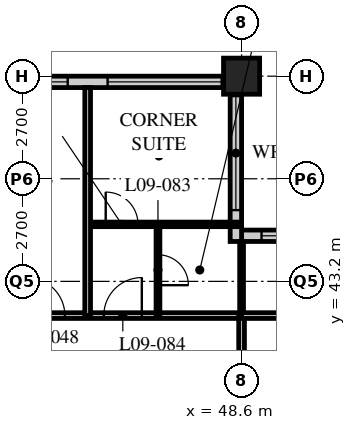
"""IFC4 building model, lengths in metres.
Left out: names, types, materials, properties, quantities, classifications, styles, units other than length and angle.
Written with IfcOpenShell. Run it as: python <this file> out.ifc"""

import sys

from ifc_helpers import new_model, si_unit, direction, frame, frame_2d, origin, origin_2d, place, context, subcontext, project, spatial, rectangle, hollow_rectangle, extrude, element, fill, save


model = new_model("IFC4")
c1 = context("Model", 3, precision=1e-05, world=origin(), true_north=direction((0.0, 1.0)))
c2 = subcontext(c1, "Body", "Model", "MODEL_VIEW")
j1 = project(units=[si_unit("LENGTHUNIT", "METRE"), si_unit("PLANEANGLEUNIT", "RADIAN")], contexts=[c1])
p1 = place(None, origin())
s1 = spatial("IfcSite", under=j1, at=p1, CompositionType="ELEMENT")
p2 = place(p1, origin())
s2 = spatial("IfcBuilding", under=s1, at=p2, CompositionType="ELEMENT")
p3 = place(p2, frame((0.0, 0.0, 43.2)))
s3 = spatial("IfcBuildingStorey", under=s2, at=p3, CompositionType="ELEMENT", Elevation=43.2)
p4 = place(p3, frame((48.6, 48.6, 0.0), z_axis=(0.0, 0.0, 1.0), x_axis=(1.0, 0.0, 0.0)))
e1 = element("IfcColumn", 1, at=p4, inside=s3, PredefinedType="COLUMN", context=c2, shape_type="SweptSolid", body=[
    extrude(hollow_rectangle(XDim=0.95, YDim=0.95, WallThickness=0.095, at=origin_2d()), origin(), (0.0, 0.0, 1.0), 3.4),
])
p5 = place(p3, frame((52.35, 44.4, 0.0), z_axis=(0.0, 0.0, 1.0), x_axis=(-1.0, 0.0, 0.0)))
e2 = element("IfcWall", 2, at=p5, inside=s3, PredefinedType="SOLIDWALL", context=c2, shape_type="SweptSolid", body=[
    extrude(rectangle(XDim=3.75, YDim=0.3, at=frame_2d((1.875, 0.0))), origin(), (0.0, 0.0, 1.0), 3.19),
])
p6 = place(p5, frame((0.225, 0.0, 0.9)))
e3 = element("IfcOpeningElement", 3, at=p6, cuts=e2, PredefinedType="OPENING", context=c2, shape_type="SweptSolid", body=[
    extrude(rectangle(XDim=3.0, YDim=1.5, at=frame_2d((1.5, 0.75))), frame((0.0, 0.16, 0.0), z_axis=(0.0, -1.0, 0.0), x_axis=(1.0, 0.0, 0.0)), (0.0, 0.0, 1.0), 0.32),
])
p7 = place(p3, frame((48.45, 44.25, 0.0), z_axis=(0.0, 0.0, 1.0), x_axis=(0.0, 1.0, 0.0)))
e4 = element("IfcWall", 4, at=p7, inside=s3, PredefinedType="SOLIDWALL", context=c2, shape_type="SweptSolid", body=[
    extrude(rectangle(XDim=4.35, YDim=0.3, at=frame_2d((2.175, 0.0))), origin(), (0.0, 0.0, 1.0), 3.19),
])
p8 = place(p7, frame((0.825, 0.0, 0.9)))
e5 = element("IfcOpeningElement", 5, at=p8, cuts=e4, PredefinedType="OPENING", context=c2, shape_type="SweptSolid", body=[
    extrude(rectangle(XDim=3.0, YDim=1.5, at=frame_2d((1.5, 0.75))), frame((0.0, 0.16, 0.0), z_axis=(0.0, -1.0, 0.0), x_axis=(1.0, 0.0, 0.0)), (0.0, 0.0, 1.0), 0.32),
])
p9 = place(p3, frame((48.3, 48.45, 0.0), z_axis=(0.0, 0.0, 1.0), x_axis=(-1.0, 0.0, 0.0)))
e6 = element("IfcWall", 6, at=p9, inside=s3, PredefinedType="SOLIDWALL", context=c2, shape_type="SweptSolid", body=[
    extrude(rectangle(XDim=40.2, YDim=0.3, at=frame_2d((20.1, 0.0))), origin(), (0.0, 0.0, 1.0), 3.19),
])
p10 = place(p9, frame((0.225, 0.0, 0.9)))
e7 = element("IfcOpeningElement", 7, at=p10, cuts=e6, PredefinedType="OPENING", context=c2, shape_type="SweptSolid", body=[
    extrude(rectangle(XDim=3.0, YDim=2.0, at=frame_2d((1.5, 1.0))), frame((0.0, 0.16, 0.0), z_axis=(0.0, -1.0, 0.0), x_axis=(1.0, 0.0, 0.0)), (0.0, 0.0, 1.0), 0.32),
])
p11 = place(p9, frame((4.275, 0.0, 0.9)))
e8 = element("IfcOpeningElement", 8, at=p11, cuts=e6, PredefinedType="OPENING", context=c2, shape_type="SweptSolid", body=[
    extrude(rectangle(XDim=3.0, YDim=2.0, at=frame_2d((1.5, 1.0))), frame((0.0, 0.16, 0.0), z_axis=(0.0, -1.0, 0.0), x_axis=(1.0, 0.0, 0.0)), (0.0, 0.0, 1.0), 0.32),
])
p12 = place(p9, frame((8.325, 0.0, 0.9)))
e9 = element("IfcOpeningElement", 9, at=p12, cuts=e6, PredefinedType="OPENING", context=c2, shape_type="SweptSolid", body=[
    extrude(rectangle(XDim=3.0, YDim=2.0, at=frame_2d((1.5, 1.0))), frame((0.0, 0.16, 0.0), z_axis=(0.0, -1.0, 0.0), x_axis=(1.0, 0.0, 0.0)), (0.0, 0.0, 1.0), 0.32),
])
p13 = place(p9, frame((12.375, 0.0, 0.9)))
e10 = element("IfcOpeningElement", 10, at=p13, cuts=e6, PredefinedType="OPENING", context=c2, shape_type="SweptSolid", body=[
    extrude(rectangle(XDim=3.0, YDim=2.0, at=frame_2d((1.5, 1.0))), frame((0.0, 0.16, 0.0), z_axis=(0.0, -1.0, 0.0), x_axis=(1.0, 0.0, 0.0)), (0.0, 0.0, 1.0), 0.32),
])
p14 = place(p9, frame((16.425, 0.0, 0.9)))
e11 = element("IfcOpeningElement", 11, at=p14, cuts=e6, PredefinedType="OPENING", context=c2, shape_type="SweptSolid", body=[
    extrude(rectangle(XDim=3.0, YDim=2.0, at=frame_2d((1.5, 1.0))), frame((0.0, 0.16, 0.0), z_axis=(0.0, -1.0, 0.0), x_axis=(1.0, 0.0, 0.0)), (0.0, 0.0, 1.0), 0.32),
])
p15 = place(p9, frame((20.475, 0.0, 0.9)))
e12 = element("IfcOpeningElement", 12, at=p15, cuts=e6, PredefinedType="OPENING", context=c2, shape_type="SweptSolid", body=[
    extrude(rectangle(XDim=3.0, YDim=2.0, at=frame_2d((1.5, 1.0))), frame((0.0, 0.16, 0.0), z_axis=(0.0, -1.0, 0.0), x_axis=(1.0, 0.0, 0.0)), (0.0, 0.0, 1.0), 0.32),
])
p16 = place(p9, frame((24.525, 0.0, 0.9)))
e13 = element("IfcOpeningElement", 13, at=p16, cuts=e6, PredefinedType="OPENING", context=c2, shape_type="SweptSolid", body=[
    extrude(rectangle(XDim=3.0, YDim=2.0, at=frame_2d((1.5, 1.0))), frame((0.0, 0.16, 0.0), z_axis=(0.0, -1.0, 0.0), x_axis=(1.0, 0.0, 0.0)), (0.0, 0.0, 1.0), 0.32),
])
p17 = place(p9, frame((28.575, 0.0, 0.9)))
e14 = element("IfcOpeningElement", 14, at=p17, cuts=e6, PredefinedType="OPENING", context=c2, shape_type="SweptSolid", body=[
    extrude(rectangle(XDim=3.0, YDim=2.0, at=frame_2d((1.5, 1.0))), frame((0.0, 0.16, 0.0), z_axis=(0.0, -1.0, 0.0), x_axis=(1.0, 0.0, 0.0)), (0.0, 0.0, 1.0), 0.32),
])
p18 = place(p9, frame((32.625, 0.0, 0.9)))
e15 = element("IfcOpeningElement", 15, at=p18, cuts=e6, PredefinedType="OPENING", context=c2, shape_type="SweptSolid", body=[
    extrude(rectangle(XDim=3.0, YDim=2.0, at=frame_2d((1.5, 1.0))), frame((0.0, 0.16, 0.0), z_axis=(0.0, -1.0, 0.0), x_axis=(1.0, 0.0, 0.0)), (0.0, 0.0, 1.0), 0.32),
])
p19 = place(p9, frame((36.675, 0.0, 0.9)))
e16 = element("IfcOpeningElement", 16, at=p19, cuts=e6, PredefinedType="OPENING", context=c2, shape_type="SweptSolid", body=[
    extrude(rectangle(XDim=3.0, YDim=2.0, at=frame_2d((1.5, 1.0))), frame((0.0, 0.16, 0.0), z_axis=(0.0, -1.0, 0.0), x_axis=(1.0, 0.0, 0.0)), (0.0, 0.0, 1.0), 0.32),
])
p20 = place(p3, frame((8.1, 42.3, 0.0), z_axis=(0.0, 0.0, 1.0), x_axis=(1.0, 0.0, 0.0)))
e17 = element("IfcWall", 17, at=p20, inside=s3, PredefinedType="PARTITIONING", context=c2, shape_type="SweptSolid", body=[
    extrude(rectangle(XDim=40.5, YDim=0.15, at=frame_2d((20.25, 0.0))), origin(), (0.0, 0.0, 1.0), 3.19),
])
p21 = place(p20, frame((6.5, 0.0, 0.0)))
e18 = element("IfcOpeningElement", 18, at=p21, cuts=e17, PredefinedType="OPENING", context=c2, shape_type="SweptSolid", body=[
    extrude(rectangle(XDim=1.0, YDim=2.1, at=frame_2d((0.5, 1.05))), frame((0.0, 0.085, 0.0), z_axis=(0.0, -1.0, 0.0), x_axis=(1.0, 0.0, 0.0)), (0.0, 0.0, 1.0), 0.17),
])
p22 = place(p20, frame((10.55, 0.0, 0.0)))
e19 = element("IfcOpeningElement", 19, at=p22, cuts=e17, PredefinedType="OPENING", context=c2, shape_type="SweptSolid", body=[
    extrude(rectangle(XDim=1.0, YDim=2.1, at=frame_2d((0.5, 1.05))), frame((0.0, 0.085, 0.0), z_axis=(0.0, -1.0, 0.0), x_axis=(1.0, 0.0, 0.0)), (0.0, 0.0, 1.0), 0.17),
])
p23 = place(p20, frame((14.6, 0.0, 0.0)))
e20 = element("IfcOpeningElement", 20, at=p23, cuts=e17, PredefinedType="OPENING", context=c2, shape_type="SweptSolid", body=[
    extrude(rectangle(XDim=1.0, YDim=2.1, at=frame_2d((0.5, 1.05))), frame((0.0, 0.085, 0.0), z_axis=(0.0, -1.0, 0.0), x_axis=(1.0, 0.0, 0.0)), (0.0, 0.0, 1.0), 0.17),
])
p24 = place(p20, frame((18.65, 0.0, 0.0)))
e21 = element("IfcOpeningElement", 21, at=p24, cuts=e17, PredefinedType="OPENING", context=c2, shape_type="SweptSolid", body=[
    extrude(rectangle(XDim=1.0, YDim=2.1, at=frame_2d((0.5, 1.05))), frame((0.0, 0.085, 0.0), z_axis=(0.0, -1.0, 0.0), x_axis=(1.0, 0.0, 0.0)), (0.0, 0.0, 1.0), 0.17),
])
p25 = place(p20, frame((22.7, 0.0, 0.0)))
e22 = element("IfcOpeningElement", 22, at=p25, cuts=e17, PredefinedType="OPENING", context=c2, shape_type="SweptSolid", body=[
    extrude(rectangle(XDim=1.0, YDim=2.1, at=frame_2d((0.5, 1.05))), frame((0.0, 0.085, 0.0), z_axis=(0.0, -1.0, 0.0), x_axis=(1.0, 0.0, 0.0)), (0.0, 0.0, 1.0), 0.17),
])
p26 = place(p20, frame((26.75, 0.0, 0.0)))
e23 = element("IfcOpeningElement", 23, at=p26, cuts=e17, PredefinedType="OPENING", context=c2, shape_type="SweptSolid", body=[
    extrude(rectangle(XDim=1.0, YDim=2.1, at=frame_2d((0.5, 1.05))), frame((0.0, 0.085, 0.0), z_axis=(0.0, -1.0, 0.0), x_axis=(1.0, 0.0, 0.0)), (0.0, 0.0, 1.0), 0.17),
])
p27 = place(p20, frame((30.8, 0.0, 0.0)))
e24 = element("IfcOpeningElement", 24, at=p27, cuts=e17, PredefinedType="OPENING", context=c2, shape_type="SweptSolid", body=[
    extrude(rectangle(XDim=1.0, YDim=2.1, at=frame_2d((0.5, 1.05))), frame((0.0, 0.085, 0.0), z_axis=(0.0, -1.0, 0.0), x_axis=(1.0, 0.0, 0.0)), (0.0, 0.0, 1.0), 0.17),
])
p28 = place(p20, frame((34.85, 0.0, 0.0)))
e25 = element("IfcOpeningElement", 25, at=p28, cuts=e17, PredefinedType="OPENING", context=c2, shape_type="SweptSolid", body=[
    extrude(rectangle(XDim=1.0, YDim=2.1, at=frame_2d((0.5, 1.05))), frame((0.0, 0.085, 0.0), z_axis=(0.0, -1.0, 0.0), x_axis=(1.0, 0.0, 0.0)), (0.0, 0.0, 1.0), 0.17),
])
p29 = place(p20, frame((36.875, 0.0, 0.0)))
e26 = element("IfcOpeningElement", 26, at=p29, cuts=e17, PredefinedType="OPENING", context=c2, shape_type="SweptSolid", body=[
    extrude(rectangle(XDim=1.0, YDim=2.1, at=frame_2d((0.5, 1.05))), frame((0.0, 0.085, 0.0), z_axis=(0.0, -1.0, 0.0), x_axis=(1.0, 0.0, 0.0)), (0.0, 0.0, 1.0), 0.17),
])
p30 = place(p20, frame((2.625, 0.0, 0.0)))
e27 = element("IfcOpeningElement", 27, at=p30, cuts=e17, PredefinedType="OPENING", context=c2, shape_type="SweptSolid", body=[
    extrude(rectangle(XDim=1.0, YDim=2.1, at=frame_2d((0.5, 1.05))), frame((0.0, 0.085, 0.0), z_axis=(0.0, -1.0, 0.0), x_axis=(1.0, 0.0, 0.0)), (0.0, 0.0, 1.0), 0.17),
])
p31 = place(p3, frame((48.6, 16.2, 0.0), z_axis=(0.0, 0.0, 1.0), x_axis=(0.0, 1.0, 0.0)))
e28 = element("IfcWall", 28, at=p31, inside=s3, PredefinedType="PARTITIONING", context=c2, shape_type="SweptSolid", body=[
    extrude(rectangle(XDim=26.1, YDim=0.15, at=frame_2d((13.05, 0.0))), origin(), (0.0, 0.0, 1.0), 2.578),
])
p32 = place(p31, frame((2.75, 0.0, 0.0)))
e29 = element("IfcOpeningElement", 29, at=p32, cuts=e28, PredefinedType="OPENING", context=c2, shape_type="SweptSolid", body=[
    extrude(rectangle(XDim=1.0, YDim=2.1, at=frame_2d((0.5, 1.05))), frame((0.0, 0.085, 0.0), z_axis=(0.0, -1.0, 0.0), x_axis=(1.0, 0.0, 0.0)), (0.0, 0.0, 1.0), 0.17),
])
p33 = place(p31, frame((4.35, 0.0, 0.0)))
e30 = element("IfcOpeningElement", 30, at=p33, cuts=e28, PredefinedType="OPENING", context=c2, shape_type="SweptSolid", body=[
    extrude(rectangle(XDim=1.0, YDim=2.1, at=frame_2d((0.5, 1.05))), frame((0.0, 0.085, 0.0), z_axis=(0.0, -1.0, 0.0), x_axis=(1.0, 0.0, 0.0)), (0.0, 0.0, 1.0), 0.17),
])
p34 = place(p31, frame((10.85, 0.0, 0.0)))
e31 = element("IfcOpeningElement", 31, at=p34, cuts=e28, PredefinedType="OPENING", context=c2, shape_type="SweptSolid", body=[
    extrude(rectangle(XDim=1.0, YDim=2.1, at=frame_2d((0.5, 1.05))), frame((0.0, 0.085, 0.0), z_axis=(0.0, -1.0, 0.0), x_axis=(1.0, 0.0, 0.0)), (0.0, 0.0, 1.0), 0.17),
])
p35 = place(p31, frame((12.45, 0.0, 0.0)))
e32 = element("IfcOpeningElement", 32, at=p35, cuts=e28, PredefinedType="OPENING", context=c2, shape_type="SweptSolid", body=[
    extrude(rectangle(XDim=1.0, YDim=2.1, at=frame_2d((0.5, 1.05))), frame((0.0, 0.085, 0.0), z_axis=(0.0, -1.0, 0.0), x_axis=(1.0, 0.0, 0.0)), (0.0, 0.0, 1.0), 0.17),
])
p36 = place(p31, frame((18.65, 0.0, 0.0)))
e33 = element("IfcOpeningElement", 33, at=p36, cuts=e28, PredefinedType="OPENING", context=c2, shape_type="SweptSolid", body=[
    extrude(rectangle(XDim=1.0, YDim=2.1, at=frame_2d((0.5, 1.05))), frame((0.0, 0.085, 0.0), z_axis=(0.0, -1.0, 0.0), x_axis=(1.0, 0.0, 0.0)), (0.0, 0.0, 1.0), 0.17),
])
p37 = place(p31, frame((22.7, 0.0, 0.0)))
e34 = element("IfcOpeningElement", 34, at=p37, cuts=e28, PredefinedType="OPENING", context=c2, shape_type="SweptSolid", body=[
    extrude(rectangle(XDim=1.0, YDim=2.1, at=frame_2d((0.5, 1.05))), frame((0.0, 0.085, 0.0), z_axis=(0.0, -1.0, 0.0), x_axis=(1.0, 0.0, 0.0)), (0.0, 0.0, 1.0), 0.17),
])
p38 = place(p3, frame((44.55, 44.7, 0.0), z_axis=(0.0, 0.0, 1.0), x_axis=(1.0, 0.0, 0.0)))
e35 = element("IfcWall", 35, at=p38, inside=s3, PredefinedType="PARTITIONING", context=c2, shape_type="SweptSolid", body=[
    extrude(rectangle(XDim=4.05, YDim=0.12, at=frame_2d((2.025, 0.0))), origin(), (0.0, 0.0, 1.0), 3.19),
])
p39 = place(p38, frame((0.475, 0.0, 0.0)))
e36 = element("IfcOpeningElement", 36, at=p39, cuts=e35, PredefinedType="OPENING", context=c2, shape_type="SweptSolid", body=[
    extrude(rectangle(XDim=0.85, YDim=2.1, at=frame_2d((0.425, 1.05))), frame((0.0, 0.07, 0.0), z_axis=(0.0, -1.0, 0.0), x_axis=(1.0, 0.0, 0.0)), (0.0, 0.0, 1.0), 0.14),
])
p40 = place(p3, frame((46.4, 42.3, 0.0), z_axis=(0.0, 0.0, 1.0), x_axis=(0.0, 1.0, 0.0)))
e37 = element("IfcWall", 37, at=p40, inside=s3, PredefinedType="PARTITIONING", context=c2, shape_type="SweptSolid", body=[
    extrude(rectangle(XDim=2.4, YDim=0.1, at=frame_2d((1.2, 0.0))), origin(), (0.0, 0.0, 1.0), 3.19),
])
p41 = place(p40, frame((0.8, 0.0, 0.0)))
e38 = element("IfcOpeningElement", 38, at=p41, cuts=e37, PredefinedType="OPENING", context=c2, shape_type="SweptSolid", body=[
    extrude(rectangle(XDim=0.8, YDim=2.1, at=frame_2d((0.4, 1.05))), frame((0.0, 0.06, 0.0), z_axis=(0.0, -1.0, 0.0), x_axis=(1.0, 0.0, 0.0)), (0.0, 0.0, 1.0), 0.12),
])
p42 = place(p3, frame((48.6, 42.3, 0.0), z_axis=(0.0, 0.0, 1.0), x_axis=(0.0, 1.0, 0.0)))
e39 = element("IfcWall", 39, at=p42, inside=s3, PredefinedType="PARTITIONING", context=c2, shape_type="SweptSolid", body=[
    extrude(rectangle(XDim=1.95, YDim=0.1, at=frame_2d((0.975, 0.0))), origin(), (0.0, 0.0, 1.0), 2.578),
])
p43 = place(p3, frame((48.6, 42.3, 0.0), z_axis=(0.0, 0.0, 1.0), x_axis=(1.0, 0.0, 0.0)))
e40 = element("IfcWall", 40, at=p43, inside=s3, PredefinedType="PARTITIONING", context=c2, shape_type="SweptSolid", body=[
    extrude(rectangle(XDim=3.75, YDim=0.15, at=frame_2d((1.875, 0.0))), origin(), (0.0, 0.0, 1.0), 3.19),
])
p44 = place(p3, frame((44.55, 42.3, 0.0), z_axis=(0.0, 0.0, 1.0), x_axis=(0.0, 1.0, 0.0)))
e41 = element("IfcWall", 41, at=p44, inside=s3, PredefinedType="PARTITIONING", context=c2, shape_type="SweptSolid", body=[
    extrude(rectangle(XDim=6.0, YDim=0.15, at=frame_2d((3.0, 0.0))), origin(), (0.0, 0.0, 1.0), 3.19),
])
p45 = place(p6, origin())
e42 = element("IfcWindow", 42, at=p45, inside=s3, PartitioningType="SINGLE_PANEL", PredefinedType="WINDOW", context=c2, shape_type="SweptSolid", body=[
    extrude(rectangle(XDim=3.0, YDim=1.5, at=frame_2d((1.5, 0.75))), frame((0.0, 0.03, 0.0), z_axis=(0.0, -1.0, 0.0), x_axis=(1.0, 0.0, 0.0)), (0.0, 0.0, 1.0), 0.06),
])
fill(e3, e42)
p46 = place(p8, origin())
e43 = element("IfcWindow", 43, at=p46, inside=s3, PartitioningType="SINGLE_PANEL", PredefinedType="WINDOW", context=c2, shape_type="SweptSolid", body=[
    extrude(rectangle(XDim=3.0, YDim=1.5, at=frame_2d((1.5, 0.75))), frame((0.0, 0.03, 0.0), z_axis=(0.0, -1.0, 0.0), x_axis=(1.0, 0.0, 0.0)), (0.0, 0.0, 1.0), 0.06),
])
fill(e5, e43)
p47 = place(p10, origin())
e44 = element("IfcWindow", 44, at=p47, inside=s3, PartitioningType="SINGLE_PANEL", PredefinedType="WINDOW", context=c2, shape_type="SweptSolid", body=[
    extrude(rectangle(XDim=3.0, YDim=2.0, at=frame_2d((1.5, 1.0))), frame((0.0, 0.03, 0.0), z_axis=(0.0, -1.0, 0.0), x_axis=(1.0, 0.0, 0.0)), (0.0, 0.0, 1.0), 0.06),
])
fill(e7, e44)
p48 = place(p11, origin())
e45 = element("IfcWindow", 45, at=p48, inside=s3, PartitioningType="SINGLE_PANEL", PredefinedType="WINDOW", context=c2, shape_type="SweptSolid", body=[
    extrude(rectangle(XDim=3.0, YDim=2.0, at=frame_2d((1.5, 1.0))), frame((0.0, 0.03, 0.0), z_axis=(0.0, -1.0, 0.0), x_axis=(1.0, 0.0, 0.0)), (0.0, 0.0, 1.0), 0.06),
])
fill(e8, e45)
p49 = place(p28, origin())
e46 = element("IfcDoor", 46, at=p49, inside=s3, OperationType="SINGLE_SWING_LEFT", PredefinedType="DOOR", context=c2, shape_type="SweptSolid", body=[
    extrude(rectangle(XDim=1.0, YDim=2.1, at=frame_2d((0.5, 1.05))), frame((0.0, 0.025, 0.0), z_axis=(0.0, -1.0, 0.0), x_axis=(1.0, 0.0, 0.0)), (0.0, 0.0, 1.0), 0.05),
])
fill(e25, e46)
p50 = place(p41, origin())
e47 = element("IfcDoor", 47, at=p50, inside=s3, OperationType="SINGLE_SWING_RIGHT", PredefinedType="DOOR", context=c2, shape_type="SweptSolid", body=[
    extrude(rectangle(XDim=0.8, YDim=2.1, at=frame_2d((0.4, 1.05))), frame((0.0, 0.025, 0.0), z_axis=(0.0, -1.0, 0.0), x_axis=(1.0, 0.0, 0.0)), (0.0, 0.0, 1.0), 0.05),
])
fill(e38, e47)
p51 = place(p29, origin())
e48 = element("IfcDoor", 48, at=p51, inside=s3, OperationType="SINGLE_SWING_RIGHT", PredefinedType="DOOR", context=c2, shape_type="SweptSolid", body=[
    extrude(rectangle(XDim=1.0, YDim=2.1, at=frame_2d((0.5, 1.05))), frame((0.0, 0.025, 0.0), z_axis=(0.0, -1.0, 0.0), x_axis=(1.0, 0.0, 0.0)), (0.0, 0.0, 1.0), 0.05),
])
fill(e26, e48)
p52 = place(p39, origin())
e49 = element("IfcDoor", 49, at=p52, inside=s3, OperationType="SINGLE_SWING_LEFT", PredefinedType="DOOR", context=c2, shape_type="SweptSolid", body=[
    extrude(rectangle(XDim=0.85, YDim=2.1, at=frame_2d((0.425, 1.05))), frame((0.0, 0.025, 0.0), z_axis=(0.0, -1.0, 0.0), x_axis=(1.0, 0.0, 0.0)), (0.0, 0.0, 1.0), 0.05),
])
fill(e36, e49)
save(model, sys.argv[1])
